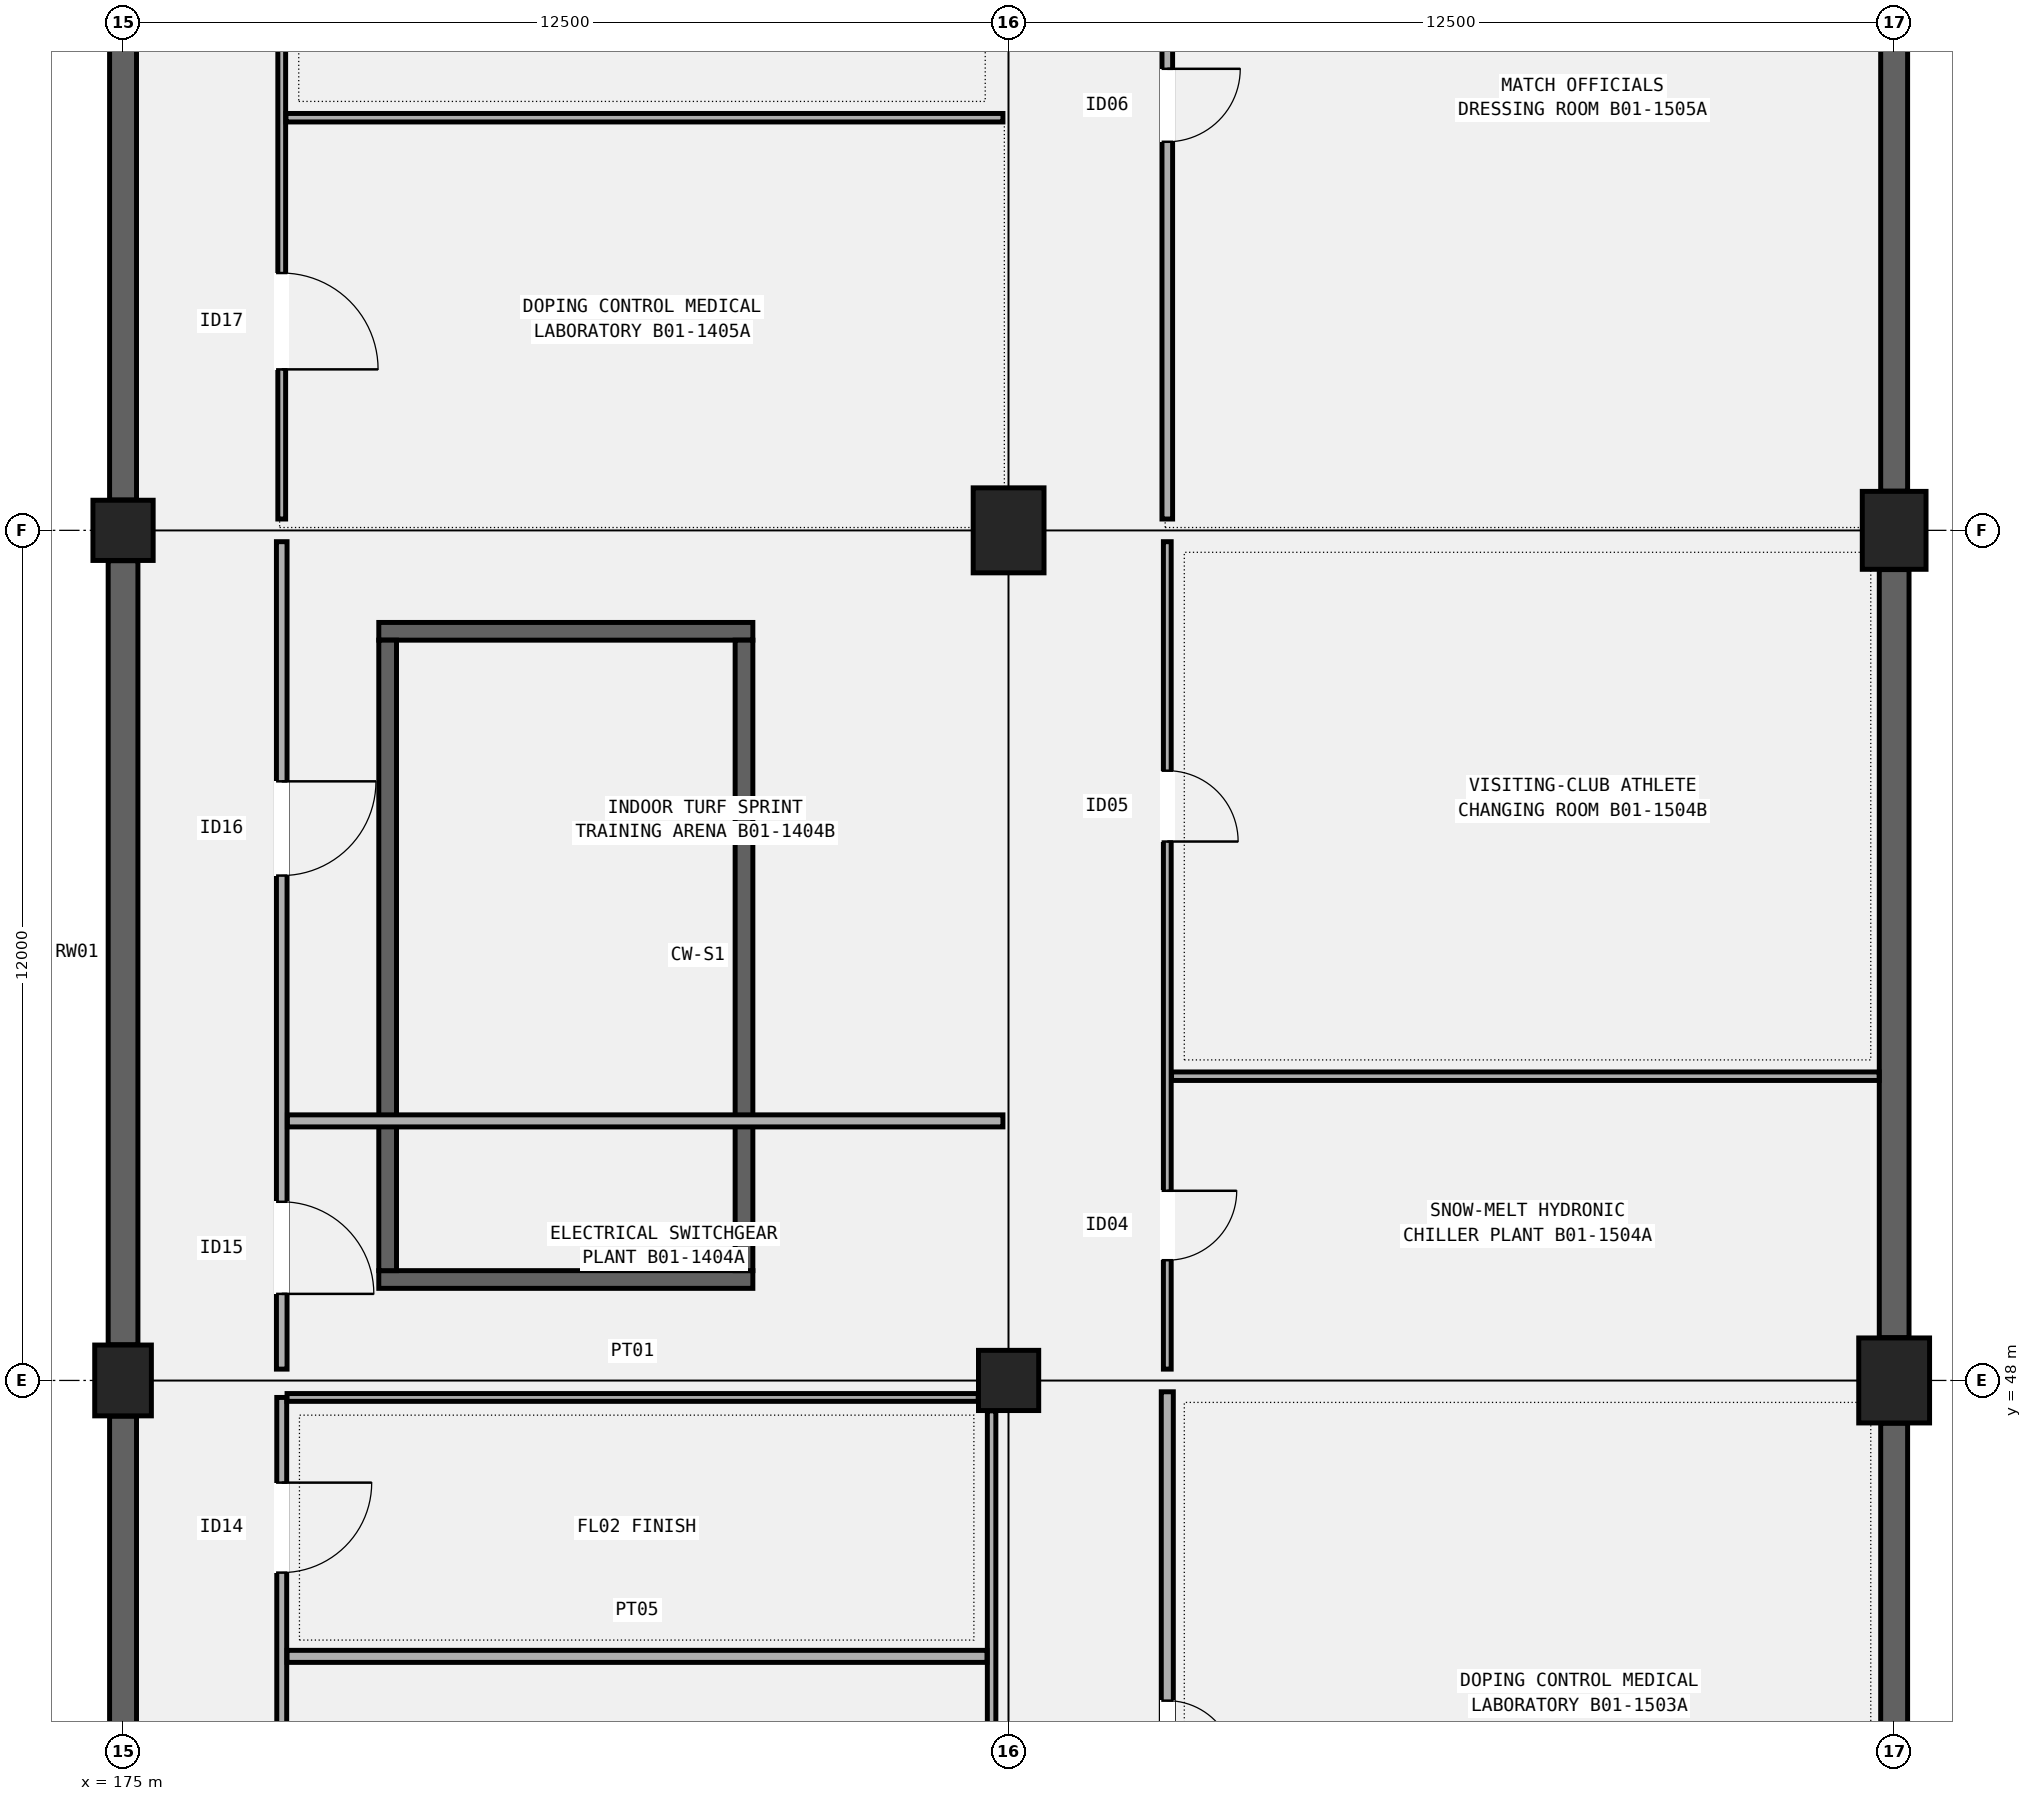
"""IFC4 building model, lengths in metres.
Left out: names, types, materials, properties, quantities, classifications, styles, units other than length and angle.
Written with IfcOpenShell. Run it as: python <this file> out.ifc"""

import sys

from ifc_helpers import new_model, si_unit, direction, frame, frame_2d, origin, origin_2d, place, context, subcontext, project, spatial, rectangle, circle, extrude, element, fill, save


model = new_model("IFC4")
c1 = context("Model", 3, precision=1e-05, world=origin(), true_north=direction((0.0, 1.0)))
c2 = subcontext(c1, "Body", "Model", "MODEL_VIEW")
j1 = project(units=[si_unit("LENGTHUNIT", "METRE"), si_unit("PLANEANGLEUNIT", "RADIAN")], contexts=[c1])
p1 = place(None, origin())
s1 = spatial("IfcSite", under=j1, at=p1, CompositionType="ELEMENT")
p2 = place(p1, origin())
s2 = spatial("IfcBuilding", under=s1, at=p2, CompositionType="ELEMENT")
p3 = place(p2, frame((0.0, 0.0, -4.8)))
s3 = spatial("IfcBuildingStorey", under=s2, at=p3, CompositionType="ELEMENT", Elevation=-4.8)
p4 = place(p3, frame((175.0, 48.0, 0.0), z_axis=(0.0, 0.0, 1.0), x_axis=(1.0, 0.0, 0.0)))
e1 = element("IfcColumn", 1, at=p4, inside=s3, PredefinedType="COLUMN", context=c2, shape_type="SweptSolid", body=[
    extrude(rectangle(XDim=0.8, YDim=1.0, at=origin_2d()), origin(), (0.0, 0.0, 1.0), 4.8),
])
for number, where, z_axis, x_axis in (
    (2, (175.0, 60.0, 0.0), (0.0, 0.0, 1.0), (1.0, 0.0, 0.0)),
    (3, (187.5, 48.0, 0.0), (0.0, 0.0, 1.0), (1.0, 0.0, 0.0)),
):
    element("IfcColumn", number, at=place(p3, frame(where, z_axis=z_axis, x_axis=x_axis)), inside=s3, PredefinedType="COLUMN", context=c2, shape_type="SweptSolid", body=[
        extrude(circle(Radius=0.425, at=origin_2d()), origin(), (0.0, 0.0, 1.0), 4.8),
    ])
for number, where, z_axis, x_axis in (
    (4, (187.5, 60.0, 0.0), (0.0, 0.0, 1.0), (1.0, 0.0, 0.0)),
    (5, (200.0, 48.0, 0.0), (0.0, 0.0, 1.0), (1.0, 0.0, 0.0)),
):
    element("IfcColumn", number, at=place(p3, frame(where, z_axis=z_axis, x_axis=x_axis)), inside=s3, PredefinedType="COLUMN", context=c2, shape_type="SweptSolid", body=[
        extrude(rectangle(XDim=1.0, YDim=1.2, at=origin_2d()), origin(), (0.0, 0.0, 1.0), 4.8),
    ])
p5 = place(p3, frame((200.0, 60.0, 0.0), z_axis=(0.0, 0.0, 1.0), x_axis=(1.0, 0.0, 0.0)))
e6 = element("IfcColumn", 6, at=p5, inside=s3, PredefinedType="COLUMN", context=c2, shape_type="SweptSolid", body=[
    extrude(rectangle(XDim=0.9, YDim=1.1, at=origin_2d()), origin(), (0.0, 0.0, 1.0), 4.8),
])
p6 = place(p3, frame((175.0, 36.554, 0.0), z_axis=(0.0, 0.0, 1.0), x_axis=(0.0, 1.0, 0.0)))
e7 = element("IfcWall", 7, at=p6, inside=s3, PredefinedType="STANDARD", context=c2, shape_type="SweptSolid", body=[
    extrude(rectangle(XDim=10.942, YDim=0.38, at=frame_2d((5.471, 0.0))), origin(), (0.0, 0.0, 1.0), 4.46),
])
p7 = place(p3, frame((175.0, 48.504, 0.0), z_axis=(0.0, 0.0, 1.0), x_axis=(0.0, 1.0, 0.0)))
e8 = element("IfcWall", 8, at=p7, inside=s3, PredefinedType="STANDARD", context=c2, shape_type="SweptSolid", body=[
    extrude(rectangle(XDim=11.067, YDim=0.42, at=frame_2d((5.534, 0.0))), origin(), (0.0, 0.0, 1.0), 4.46),
])
for number, where, z_axis, x_axis in (
    (9, (175.0, 60.429, 0.0), (0.0, 0.0, 1.0), (0.0, 1.0, 0.0)),
    (10, (200.0, 36.429, 0.0), (0.0, 0.0, 1.0), (0.0, 1.0, 0.0)),
):
    element("IfcWall", number, at=place(p3, frame(where, z_axis=z_axis, x_axis=x_axis)), inside=s3, PredefinedType="STANDARD", context=c2, shape_type="SweptSolid", body=[
        extrude(rectangle(XDim=10.967, YDim=0.38, at=frame_2d((5.483, 0.0))), origin(), (0.0, 0.0, 1.0), 4.46),
    ])
p8 = place(p3, frame((200.0, 48.604, 0.0), z_axis=(0.0, 0.0, 1.0), x_axis=(0.0, 1.0, 0.0)))
e11 = element("IfcWall", 11, at=p8, inside=s3, PredefinedType="STANDARD", context=c2, shape_type="SweptSolid", body=[
    extrude(rectangle(XDim=10.842, YDim=0.42, at=frame_2d((5.421, 0.0))), origin(), (0.0, 0.0, 1.0), 4.46),
])
p9 = place(p3, frame((200.0, 60.554, 0.0), z_axis=(0.0, 0.0, 1.0), x_axis=(0.0, 1.0, 0.0)))
e12 = element("IfcWall", 12, at=p9, inside=s3, PredefinedType="STANDARD", context=c2, shape_type="SweptSolid", body=[
    extrude(rectangle(XDim=10.942, YDim=0.38, at=frame_2d((5.471, 0.0))), origin(), (0.0, 0.0, 1.0), 4.46),
])
for number, where, z_axis, x_axis in (
    (13, (178.61, 49.425, 0.0), (0.0, 0.0, 1.0), (1.0, 0.0, 0.0)),
    (14, (178.61, 58.575, 0.0), (0.0, 0.0, 1.0), (1.0, 0.0, 0.0)),
):
    element("IfcWall", number, at=place(p3, frame(where, z_axis=z_axis, x_axis=x_axis)), inside=s3, PredefinedType="SHEAR", context=c2, shape_type="SweptSolid", body=[
        extrude(rectangle(XDim=5.28, YDim=0.25, at=frame_2d((2.64, 0.0))), origin(), (0.0, 0.0, 1.0), 4.5),
    ])
for number, where, z_axis, x_axis in (
    (15, (178.735, 49.55, 0.0), (0.0, 0.0, 1.0), (0.0, 1.0, 0.0)),
    (16, (183.765, 49.55, 0.0), (0.0, 0.0, 1.0), (0.0, 1.0, 0.0)),
):
    element("IfcWall", number, at=place(p3, frame(where, z_axis=z_axis, x_axis=x_axis)), inside=s3, PredefinedType="SHEAR", context=c2, shape_type="SweptSolid", body=[
        extrude(rectangle(XDim=8.9, YDim=0.25, at=frame_2d((4.45, 0.0))), origin(), (0.0, 0.0, 1.0), 4.5),
    ])
p10 = place(p3, frame((177.24, 38.24, 0.0), z_axis=(0.0, 0.0, 1.0), x_axis=(0.0, 1.0, 0.0)))
e17 = element("IfcWall", 17, at=p10, inside=s3, PredefinedType="PARTITIONING", context=c2, shape_type="SweptSolid", body=[
    extrude(rectangle(XDim=9.52, YDim=0.14, at=frame_2d((4.76, 0.0))), origin(), (0.0, 0.0, 1.0), 3.92),
])
p11 = place(p10, frame((1.69, 0.0, 0.0), z_axis=(0.0, 0.0, 1.0), x_axis=(-1.0, 0.0, 0.0)))
e18 = element("IfcOpeningElement", 18, at=p11, cuts=e17, PredefinedType="OPENING", context=c2, shape_type="SweptSolid", body=[
    extrude(rectangle(XDim=1.21, YDim=2.18, at=frame_2d((0.605, 1.09))), frame((0.0, 0.08, 0.0), z_axis=(0.0, -1.0, 0.0), x_axis=(1.0, 0.0, 0.0)), (0.0, 0.0, 1.0), 0.16),
])
p12 = place(p10, frame((4.628, 0.0, 0.0), z_axis=(0.0, 0.0, 1.0), x_axis=(-1.0, 0.0, 0.0)))
e19 = element("IfcOpeningElement", 19, at=p12, cuts=e17, PredefinedType="OPENING", context=c2, shape_type="SweptSolid", body=[
    extrude(rectangle(XDim=1.24, YDim=2.22, at=frame_2d((0.62, 1.11))), frame((0.0, 0.08, 0.0), z_axis=(0.0, -1.0, 0.0), x_axis=(1.0, 0.0, 0.0)), (0.0, 0.0, 1.0), 0.16),
])
p13 = place(p10, frame((8.318, 0.0, 0.0), z_axis=(0.0, 0.0, 1.0), x_axis=(-1.0, 0.0, 0.0)))
e20 = element("IfcOpeningElement", 20, at=p13, cuts=e17, PredefinedType="OPENING", context=c2, shape_type="SweptSolid", body=[
    extrude(rectangle(XDim=1.27, YDim=2.2, at=frame_2d((0.635, 1.1))), frame((0.0, 0.08, 0.0), z_axis=(0.0, -1.0, 0.0), x_axis=(1.0, 0.0, 0.0)), (0.0, 0.0, 1.0), 0.16),
])
p14 = place(p3, frame((177.315, 47.76, 0.0), z_axis=(0.0, 0.0, 1.0), x_axis=(1.0, 0.0, 0.0)))
e21 = element("IfcWall", 21, at=p14, inside=s3, PredefinedType="PARTITIONING", context=c2, shape_type="SweptSolid", body=[
    extrude(rectangle(XDim=9.756, YDim=0.11, at=frame_2d((4.878, 0.0))), origin(), (0.0, 0.0, 1.0), 3.52),
])
p15 = place(p3, frame((187.26, 38.34, 0.0), z_axis=(0.0, 0.0, 1.0), x_axis=(0.0, 1.0, 0.0)))
e22 = element("IfcWall", 22, at=p15, inside=s3, PredefinedType="PARTITIONING", context=c2, shape_type="SweptSolid", body=[
    extrude(rectangle(XDim=9.231, YDim=0.12, at=frame_2d((4.615, 0.0))), origin(), (0.0, 0.0, 1.0), 3.52),
])
p16 = place(p3, frame((177.315, 44.105, 0.0), z_axis=(0.0, 0.0, 1.0), x_axis=(1.0, 0.0, 0.0)))
e23 = element("IfcWall", 23, at=p16, inside=s3, PredefinedType="PARTITIONING", context=c2, shape_type="SweptSolid", body=[
    extrude(rectangle(XDim=9.88, YDim=0.17, at=frame_2d((4.94, 0.0))), origin(), (0.0, 0.0, 1.0), 3.92),
])
p17 = place(p3, frame((177.24, 48.16, 0.0), z_axis=(0.0, 0.0, 1.0), x_axis=(0.0, 1.0, 0.0)))
e24 = element("IfcWall", 24, at=p17, inside=s3, PredefinedType="PARTITIONING", context=c2, shape_type="SweptSolid", body=[
    extrude(rectangle(XDim=11.68, YDim=0.15, at=frame_2d((5.84, 0.0))), origin(), (0.0, 0.0, 1.0), 3.92),
])
p18 = place(p17, frame((2.362, 0.0, 0.0), z_axis=(0.0, 0.0, 1.0), x_axis=(-1.0, 0.0, 0.0)))
e25 = element("IfcOpeningElement", 25, at=p18, cuts=e24, PredefinedType="OPENING", context=c2, shape_type="SweptSolid", body=[
    extrude(rectangle(XDim=1.3, YDim=2.24, at=frame_2d((0.65, 1.12))), frame((0.0, 0.085, 0.0), z_axis=(0.0, -1.0, 0.0), x_axis=(1.0, 0.0, 0.0)), (0.0, 0.0, 1.0), 0.17),
])
p19 = place(p17, frame((8.297, 0.0, 0.0), z_axis=(0.0, 0.0, 1.0), x_axis=(-1.0, 0.0, 0.0)))
e26 = element("IfcOpeningElement", 26, at=p19, cuts=e24, PredefinedType="OPENING", context=c2, shape_type="SweptSolid", body=[
    extrude(rectangle(XDim=1.33, YDim=2.22, at=frame_2d((0.665, 1.11))), frame((0.0, 0.085, 0.0), z_axis=(0.0, -1.0, 0.0), x_axis=(1.0, 0.0, 0.0)), (0.0, 0.0, 1.0), 0.17),
])
p20 = place(p3, frame((177.32, 51.664, 0.0), z_axis=(0.0, 0.0, 1.0), x_axis=(1.0, 0.0, 0.0)))
e27 = element("IfcWall", 27, at=p20, inside=s3, PredefinedType="PARTITIONING", context=c2, shape_type="SweptSolid", body=[
    extrude(rectangle(XDim=10.1, YDim=0.17, at=frame_2d((5.05, 0.0))), origin(), (0.0, 0.0, 1.0), 3.92),
])
p21 = place(p3, frame((177.24, 60.16, 0.0), z_axis=(0.0, 0.0, 1.0), x_axis=(0.0, 1.0, 0.0)))
e28 = element("IfcWall", 28, at=p21, inside=s3, PredefinedType="PARTITIONING", context=c2, shape_type="SweptSolid", body=[
    extrude(rectangle(XDim=11.68, YDim=0.11, at=frame_2d((5.84, 0.0))), origin(), (0.0, 0.0, 1.0), 3.92),
])
p22 = place(p21, frame((3.472, 0.0, 0.0), z_axis=(0.0, 0.0, 1.0), x_axis=(-1.0, 0.0, 0.0)))
e29 = element("IfcOpeningElement", 29, at=p22, cuts=e28, PredefinedType="OPENING", context=c2, shape_type="SweptSolid", body=[
    extrude(rectangle(XDim=1.36, YDim=2.25, at=frame_2d((0.68, 1.125))), frame((0.0, 0.065, 0.0), z_axis=(0.0, -1.0, 0.0), x_axis=(1.0, 0.0, 0.0)), (0.0, 0.0, 1.0), 0.13),
])
p23 = place(p21, frame((9.412, 0.0, 0.0), z_axis=(0.0, 0.0, 1.0), x_axis=(-1.0, 0.0, 0.0)))
e30 = element("IfcOpeningElement", 30, at=p23, cuts=e28, PredefinedType="OPENING", context=c2, shape_type="SweptSolid", body=[
    extrude(rectangle(XDim=1.4, YDim=2.24, at=frame_2d((0.7, 1.12))), frame((0.0, 0.065, 0.0), z_axis=(0.0, -1.0, 0.0), x_axis=(1.0, 0.0, 0.0)), (0.0, 0.0, 1.0), 0.13),
])
p24 = place(p3, frame((177.3, 65.825, 0.0), z_axis=(0.0, 0.0, 1.0), x_axis=(1.0, 0.0, 0.0)))
e31 = element("IfcWall", 31, at=p24, inside=s3, PredefinedType="PARTITIONING", context=c2, shape_type="SweptSolid", body=[
    extrude(rectangle(XDim=10.12, YDim=0.12, at=frame_2d((5.06, 0.0))), origin(), (0.0, 0.0, 1.0), 3.92),
])
p25 = place(p3, frame((189.74, 38.17, 0.0), z_axis=(0.0, 0.0, 1.0), x_axis=(0.0, 1.0, 0.0)))
e32 = element("IfcWall", 32, at=p25, inside=s3, PredefinedType="PARTITIONING", context=c2, shape_type="SweptSolid", body=[
    extrude(rectangle(XDim=9.67, YDim=0.17, at=frame_2d((4.835, 0.0))), origin(), (0.0, 0.0, 1.0), 3.92),
])
p26 = place(p25, frame((5.31, 0.0, 0.0), z_axis=(0.0, 0.0, 1.0), x_axis=(-1.0, 0.0, 0.0)))
e33 = element("IfcOpeningElement", 33, at=p26, cuts=e32, PredefinedType="OPENING", context=c2, shape_type="SweptSolid", body=[
    extrude(rectangle(XDim=0.95, YDim=2.12, at=frame_2d((0.475, 1.06))), frame((0.0, 0.095, 0.0), z_axis=(0.0, -1.0, 0.0), x_axis=(1.0, 0.0, 0.0)), (0.0, 0.0, 1.0), 0.19),
])
p27 = place(p3, frame((189.74, 48.16, 0.0), z_axis=(0.0, 0.0, 1.0), x_axis=(0.0, 1.0, 0.0)))
e34 = element("IfcWall", 34, at=p27, inside=s3, PredefinedType="PARTITIONING", context=c2, shape_type="SweptSolid", body=[
    extrude(rectangle(XDim=11.68, YDim=0.11, at=frame_2d((5.84, 0.0))), origin(), (0.0, 0.0, 1.0), 3.92),
])
p28 = place(p27, frame((2.517, 0.0, 0.0), z_axis=(0.0, 0.0, 1.0), x_axis=(-1.0, 0.0, 0.0)))
e35 = element("IfcOpeningElement", 35, at=p28, cuts=e34, PredefinedType="OPENING", context=c2, shape_type="SweptSolid", body=[
    extrude(rectangle(XDim=0.98, YDim=2.1, at=frame_2d((0.49, 1.05))), frame((0.0, 0.065, 0.0), z_axis=(0.0, -1.0, 0.0), x_axis=(1.0, 0.0, 0.0)), (0.0, 0.0, 1.0), 0.13),
])
p29 = place(p27, frame((8.447, 0.0, 0.0), z_axis=(0.0, 0.0, 1.0), x_axis=(-1.0, 0.0, 0.0)))
e36 = element("IfcOpeningElement", 36, at=p29, cuts=e34, PredefinedType="OPENING", context=c2, shape_type="SweptSolid", body=[
    extrude(rectangle(XDim=1.0, YDim=2.14, at=frame_2d((0.5, 1.07))), frame((0.0, 0.065, 0.0), z_axis=(0.0, -1.0, 0.0), x_axis=(1.0, 0.0, 0.0)), (0.0, 0.0, 1.0), 0.13),
])
p30 = place(p3, frame((189.8, 52.295, 0.0), z_axis=(0.0, 0.0, 1.0), x_axis=(1.0, 0.0, 0.0)))
e37 = element("IfcWall", 37, at=p30, inside=s3, PredefinedType="PARTITIONING", context=c2, shape_type="SweptSolid", body=[
    extrude(rectangle(XDim=9.988, YDim=0.12, at=frame_2d((4.994, 0.0))), origin(), (0.0, 0.0, 1.0), 3.92),
])
p31 = place(p3, frame((189.74, 60.16, 0.0), z_axis=(0.0, 0.0, 1.0), x_axis=(0.0, 1.0, 0.0)))
e38 = element("IfcWall", 38, at=p31, inside=s3, PredefinedType="PARTITIONING", context=c2, shape_type="SweptSolid", body=[
    extrude(rectangle(XDim=11.68, YDim=0.15, at=frame_2d((5.84, 0.0))), origin(), (0.0, 0.0, 1.0), 3.92),
])
p32 = place(p31, frame((6.355, 0.0, 0.0), z_axis=(0.0, 0.0, 1.0), x_axis=(-1.0, 0.0, 0.0)))
e39 = element("IfcOpeningElement", 39, at=p32, cuts=e38, PredefinedType="OPENING", context=c2, shape_type="SweptSolid", body=[
    extrude(rectangle(XDim=1.03, YDim=2.12, at=frame_2d((0.515, 1.06))), frame((0.0, 0.085, 0.0), z_axis=(0.0, -1.0, 0.0), x_axis=(1.0, 0.0, 0.0)), (0.0, 0.0, 1.0), 0.17),
])
p33 = place(p13, origin())
e40 = element("IfcDoor", 40, at=p33, inside=s3, OperationType="SINGLE_SWING_LEFT", PredefinedType="DOOR", context=c2, shape_type="SweptSolid", body=[
    extrude(rectangle(XDim=1.27, YDim=2.2, at=frame_2d((0.635, 1.1))), frame((0.0, 0.025, 0.0), z_axis=(0.0, -1.0, 0.0), x_axis=(1.0, 0.0, 0.0)), (0.0, 0.0, 1.0), 0.05),
])
fill(e20, e40)
p34 = place(p18, origin())
e41 = element("IfcDoor", 41, at=p34, inside=s3, OperationType="SINGLE_SWING_RIGHT", PredefinedType="DOOR", context=c2, shape_type="SweptSolid", body=[
    extrude(rectangle(XDim=1.3, YDim=2.24, at=frame_2d((0.65, 1.12))), frame((0.0, 0.025, 0.0), z_axis=(0.0, -1.0, 0.0), x_axis=(1.0, 0.0, 0.0)), (0.0, 0.0, 1.0), 0.05),
])
fill(e25, e41)
p35 = place(p19, origin())
e42 = element("IfcDoor", 42, at=p35, inside=s3, OperationType="SINGLE_SWING_LEFT", PredefinedType="DOOR", context=c2, shape_type="SweptSolid", body=[
    extrude(rectangle(XDim=1.33, YDim=2.22, at=frame_2d((0.665, 1.11))), frame((0.0, 0.025, 0.0), z_axis=(0.0, -1.0, 0.0), x_axis=(1.0, 0.0, 0.0)), (0.0, 0.0, 1.0), 0.05),
])
fill(e26, e42)
p36 = place(p22, origin())
e43 = element("IfcDoor", 43, at=p36, inside=s3, OperationType="SINGLE_SWING_RIGHT", PredefinedType="DOOR", context=c2, shape_type="SweptSolid", body=[
    extrude(rectangle(XDim=1.36, YDim=2.25, at=frame_2d((0.68, 1.125))), frame((0.0, 0.025, 0.0), z_axis=(0.0, -1.0, 0.0), x_axis=(1.0, 0.0, 0.0)), (0.0, 0.0, 1.0), 0.05),
])
fill(e29, e43)
p37 = place(p26, origin())
e44 = element("IfcDoor", 44, at=p37, inside=s3, OperationType="SINGLE_SWING_RIGHT", PredefinedType="DOOR", context=c2, shape_type="SweptSolid", body=[
    extrude(rectangle(XDim=0.95, YDim=2.12, at=frame_2d((0.475, 1.06))), frame((0.0, 0.025, 0.0), z_axis=(0.0, -1.0, 0.0), x_axis=(1.0, 0.0, 0.0)), (0.0, 0.0, 1.0), 0.05),
])
fill(e33, e44)
p38 = place(p28, origin())
e45 = element("IfcDoor", 45, at=p38, inside=s3, OperationType="SINGLE_SWING_LEFT", PredefinedType="DOOR", context=c2, shape_type="SweptSolid", body=[
    extrude(rectangle(XDim=0.98, YDim=2.1, at=frame_2d((0.49, 1.05))), frame((0.0, 0.025, 0.0), z_axis=(0.0, -1.0, 0.0), x_axis=(1.0, 0.0, 0.0)), (0.0, 0.0, 1.0), 0.05),
])
fill(e35, e45)
p39 = place(p29, origin())
e46 = element("IfcDoor", 46, at=p39, inside=s3, OperationType="SINGLE_SWING_RIGHT", PredefinedType="DOOR", context=c2, shape_type="SweptSolid", body=[
    extrude(rectangle(XDim=1.0, YDim=2.14, at=frame_2d((0.5, 1.07))), frame((0.0, 0.025, 0.0), z_axis=(0.0, -1.0, 0.0), x_axis=(1.0, 0.0, 0.0)), (0.0, 0.0, 1.0), 0.05),
])
fill(e36, e46)
p40 = place(p32, origin())
e47 = element("IfcDoor", 47, at=p40, inside=s3, OperationType="SINGLE_SWING_LEFT", PredefinedType="DOOR", context=c2, shape_type="SweptSolid", body=[
    extrude(rectangle(XDim=1.03, YDim=2.12, at=frame_2d((0.515, 1.06))), frame((0.0, 0.025, 0.0), z_axis=(0.0, -1.0, 0.0), x_axis=(1.0, 0.0, 0.0)), (0.0, 0.0, 1.0), 0.05),
])
fill(e39, e47)
save(model, sys.argv[1])
